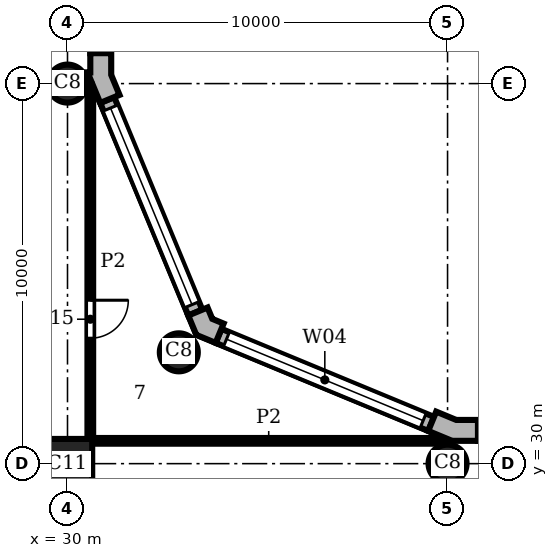
"""IFC4 building model, lengths in metres.
Left out: names, types, materials, properties, quantities, classifications, styles, units other than length and angle.
Written with IfcOpenShell. Run it as: python <this file> out.ifc"""

import sys

from ifc_helpers import new_model, si_unit, direction, frame, frame_2d, origin, origin_2d, place, context, subcontext, project, spatial, polyline, rectangle, circle, outline, extrude, element, fill, save


model = new_model("IFC4")
c1 = context("Model", 3, precision=1e-05, world=origin(), true_north=direction((0.0, 1.0)))
c2 = subcontext(c1, "Body", "Model", "MODEL_VIEW")
j1 = project(units=[si_unit("LENGTHUNIT", "METRE"), si_unit("PLANEANGLEUNIT", "RADIAN")], contexts=[c1])
p1 = place(None, origin())
s1 = spatial("IfcSite", under=j1, at=p1, CompositionType="ELEMENT")
p2 = place(p1, origin())
s2 = spatial("IfcBuilding", under=s1, at=p2, CompositionType="ELEMENT")
p3 = place(p2, frame((0.0, 0.0, 155.1)))
s3 = spatial("IfcBuildingStorey", under=s2, at=p3, CompositionType="ELEMENT", Elevation=155.1)
for number, where, z_axis, x_axis in (
    (1, (40.0, 30.0, 0.0), (0.0, 0.0, 1.0), (1.0, 0.0, 0.0)),
    (2, (32.929, 32.929, 0.0), (0.0, 0.0, 1.0), (1.0, 0.0, 0.0)),
    (3, (30.0, 40.0, 0.0), (0.0, 0.0, 1.0), (1.0, 0.0, 0.0)),
):
    element("IfcColumn", number, at=place(p3, frame(where, z_axis=z_axis, x_axis=x_axis)), inside=s3, PredefinedType="COLUMN", context=c2, shape_type="SweptSolid", body=[
        extrude(circle(Radius=0.5, at=origin_2d()), origin(), (0.0, 0.0, 1.0), 3.9),
    ])
p4 = place(p3, frame((30.0, 30.0, 0.0), z_axis=(0.0, 0.0, 1.0), x_axis=(1.0, 0.0, 0.0)))
e4 = element("IfcColumn", 4, at=p4, inside=s3, PredefinedType="COLUMN", context=c2, shape_type="SweptSolid", body=[
    extrude(rectangle(XDim=1.3, YDim=1.3, at=origin_2d()), origin(), (0.0, 0.0, 1.0), 3.9),
])
p5 = place(p3, origin())
e5 = element("IfcWall", 5, at=p5, inside=s3, PredefinedType="SOLIDWALL", context=c2, shape_type="SweptSolid", body=[
    extrude(outline(polyline([(40.8, 31.0), (40.8, 31.15), (40.229, 31.15), (39.701, 31.369), (39.644, 31.23), (39.49, 30.861), (40.119, 30.6), (40.8, 30.6), (40.8, 31.0)])), origin(), (0.0, 0.0, 1.0), 3.9),
])
e6 = element("IfcWall", 6, at=p5, inside=s3, PredefinedType="SOLIDWALL", context=c2, shape_type="SweptSolid", body=[
    extrude(outline(polyline([(34.051, 33.547), (34.108, 33.685), (33.809, 33.809), (33.685, 34.108), (33.547, 34.051), (33.177, 33.898), (33.388, 33.388), (33.898, 33.177), (34.051, 33.547)])), origin(), (0.0, 0.0, 1.0), 3.9),
])
e7 = element("IfcWall", 7, at=p5, inside=s3, PredefinedType="SOLIDWALL", context=c2, shape_type="SweptSolid", body=[
    extrude(outline(polyline([(30.62, 39.995), (30.62, 40.071), (30.861, 39.49), (31.23, 39.644), (31.369, 39.701), (31.15, 40.229), (31.15, 40.8), (31.0, 40.8), (30.6, 40.8), (30.6, 40.295), (30.5, 40.295), (30.5, 39.995), (30.62, 39.995)])), origin(), (0.0, 0.0, 1.0), 3.9),
])
p6 = place(p3, frame((59.2, 30.8, 0.0), z_axis=(0.0, 0.0, 1.0), x_axis=(-1.0, 0.0, 0.0)))
e8 = element("IfcWall", 8, at=p6, inside=s3, PredefinedType="SOLIDWALL", context=c2, shape_type="SweptSolid", body=[
    extrude(rectangle(XDim=18.4, YDim=0.4, at=frame_2d((9.2, 0.0))), origin(), (0.0, 0.0, 1.0), 3.9),
])
p7 = place(p6, frame((0.2, 0.0, 0.9)))
e9 = element("IfcOpeningElement", 9, at=p7, cuts=e8, PredefinedType="OPENING", context=c2, shape_type="SweptSolid", body=[
    extrude(rectangle(XDim=8.0, YDim=2.35, at=frame_2d((4.0, 1.175))), frame((0.0, 0.21, 0.0), z_axis=(0.0, -1.0, 0.0), x_axis=(1.0, 0.0, 0.0)), (0.0, 0.0, 1.0), 0.42),
])
p8 = place(p6, frame((10.2, 0.0, 0.9)))
e10 = element("IfcOpeningElement", 10, at=p8, cuts=e8, PredefinedType="OPENING", context=c2, shape_type="SweptSolid", body=[
    extrude(rectangle(XDim=8.0, YDim=2.35, at=frame_2d((4.0, 1.175))), frame((0.0, 0.21, 0.0), z_axis=(0.0, -1.0, 0.0), x_axis=(1.0, 0.0, 0.0)), (0.0, 0.0, 1.0), 0.42),
])
p9 = place(p3, frame((39.567, 31.045, 0.0), z_axis=(0.0, 0.0, 1.0), x_axis=(-0.923891000409, 0.382655745237, 0.0)))
e11 = element("IfcWall", 11, at=p9, inside=s3, PredefinedType="SOLIDWALL", context=c2, shape_type="SweptSolid", body=[
    extrude(rectangle(XDim=6.053, YDim=0.4, at=frame_2d((3.027, 0.0))), origin(), (0.0, 0.0, 1.0), 3.9),
])
p10 = place(p9, frame((0.227, 0.0, 0.9)))
e12 = element("IfcOpeningElement", 12, at=p10, cuts=e11, PredefinedType="OPENING", context=c2, shape_type="SweptSolid", body=[
    extrude(rectangle(XDim=5.6, YDim=2.35, at=frame_2d((2.8, 1.175))), frame((0.0, 0.21, 0.0), z_axis=(0.0, -1.0, 0.0), x_axis=(1.0, 0.0, 0.0)), (0.0, 0.0, 1.0), 0.42),
])
p11 = place(p3, frame((33.362, 33.974, 0.0), z_axis=(0.0, 0.0, 1.0), x_axis=(-0.382655745237, 0.923891000409, 0.0)))
e13 = element("IfcWall", 13, at=p11, inside=s3, PredefinedType="SOLIDWALL", context=c2, shape_type="SweptSolid", body=[
    extrude(rectangle(XDim=6.053, YDim=0.4, at=frame_2d((3.027, 0.0))), origin(), (0.0, 0.0, 1.0), 3.9),
])
p12 = place(p11, frame((0.227, 0.0, 0.9)))
e14 = element("IfcOpeningElement", 14, at=p12, cuts=e13, PredefinedType="OPENING", context=c2, shape_type="SweptSolid", body=[
    extrude(rectangle(XDim=5.6, YDim=2.35, at=frame_2d((2.8, 1.175))), frame((0.0, 0.21, 0.0), z_axis=(0.0, -1.0, 0.0), x_axis=(1.0, 0.0, 0.0)), (0.0, 0.0, 1.0), 0.42),
])
p13 = place(p3, frame((30.8, 40.8, 0.0), z_axis=(0.0, 0.0, 1.0), x_axis=(0.0, 1.0, 0.0)))
e15 = element("IfcWall", 15, at=p13, inside=s3, PredefinedType="SOLIDWALL", context=c2, shape_type="SweptSolid", body=[
    extrude(rectangle(XDim=18.4, YDim=0.4, at=frame_2d((9.2, 0.0))), origin(), (0.0, 0.0, 1.0), 3.9),
])
p14 = place(p13, frame((0.2, 0.0, 0.9)))
e16 = element("IfcOpeningElement", 16, at=p14, cuts=e15, PredefinedType="OPENING", context=c2, shape_type="SweptSolid", body=[
    extrude(rectangle(XDim=8.0, YDim=2.35, at=frame_2d((4.0, 1.175))), frame((0.0, 0.21, 0.0), z_axis=(0.0, -1.0, 0.0), x_axis=(1.0, 0.0, 0.0)), (0.0, 0.0, 1.0), 0.42),
])
p15 = place(p13, frame((10.2, 0.0, 0.9)))
e17 = element("IfcOpeningElement", 17, at=p15, cuts=e15, PredefinedType="OPENING", context=c2, shape_type="SweptSolid", body=[
    extrude(rectangle(XDim=8.0, YDim=2.35, at=frame_2d((4.0, 1.175))), frame((0.0, 0.21, 0.0), z_axis=(0.0, -1.0, 0.0), x_axis=(1.0, 0.0, 0.0)), (0.0, 0.0, 1.0), 0.42),
])
p16 = place(p3, frame((30.6, 30.65, 0.0), z_axis=(0.0, 0.0, 1.0), x_axis=(0.0, 1.0, 0.0)))
e18 = element("IfcWall", 18, at=p16, inside=s3, PredefinedType="PARTITIONING", context=c2, shape_type="SweptSolid", body=[
    extrude(rectangle(XDim=9.288, YDim=0.15, at=frame_2d((4.644, 0.0))), origin(), (0.0, 0.0, 1.0), 3.58),
])
p17 = place(p16, frame((2.65, 0.0, 0.0)))
e19 = element("IfcOpeningElement", 19, at=p17, cuts=e18, PredefinedType="OPENING", context=c2, shape_type="SweptSolid", body=[
    extrude(rectangle(XDim=1.0, YDim=2.1, at=frame_2d((0.5, 1.05))), frame((0.0, 0.085, 0.0), z_axis=(0.0, -1.0, 0.0), x_axis=(1.0, 0.0, 0.0)), (0.0, 0.0, 1.0), 0.17),
])
p18 = place(p3, frame((30.65, 30.6, 0.0), z_axis=(0.0, 0.0, 1.0), x_axis=(1.0, 0.0, 0.0)))
e20 = element("IfcWall", 20, at=p18, inside=s3, PredefinedType="PARTITIONING", context=c2, shape_type="SweptSolid", body=[
    extrude(rectangle(XDim=9.288, YDim=0.15, at=frame_2d((4.644, 0.0))), origin(), (0.0, 0.0, 1.0), 3.58),
])
p19 = place(p10, origin())
e21 = element("IfcWindow", 21, at=p19, inside=s3, PartitioningType="SINGLE_PANEL", PredefinedType="WINDOW", context=c2, shape_type="SweptSolid", body=[
    extrude(rectangle(XDim=5.6, YDim=2.35, at=frame_2d((2.8, 1.175))), frame((0.0, 0.16, 0.0), z_axis=(0.0, -1.0, 0.0), x_axis=(1.0, 0.0, 0.0)), (0.0, 0.0, 1.0), 0.06),
])
fill(e12, e21)
p20 = place(p12, origin())
e22 = element("IfcWindow", 22, at=p20, inside=s3, PartitioningType="SINGLE_PANEL", PredefinedType="WINDOW", context=c2, shape_type="SweptSolid", body=[
    extrude(rectangle(XDim=5.6, YDim=2.35, at=frame_2d((2.8, 1.175))), frame((0.0, 0.16, 0.0), z_axis=(0.0, -1.0, 0.0), x_axis=(1.0, 0.0, 0.0)), (0.0, 0.0, 1.0), 0.06),
])
fill(e14, e22)
p21 = place(p17, frame((1.0, 0.0, 0.0), z_axis=(0.0, 0.0, 1.0), x_axis=(-1.0, 0.0, 0.0)))
e23 = element("IfcDoor", 23, at=p21, inside=s3, OperationType="SINGLE_SWING_LEFT", PredefinedType="DOOR", context=c2, shape_type="SweptSolid", body=[
    extrude(rectangle(XDim=1.0, YDim=2.1, at=frame_2d((0.5, 1.05))), frame((0.0, 0.025, 0.0), z_axis=(0.0, -1.0, 0.0), x_axis=(1.0, 0.0, 0.0)), (0.0, 0.0, 1.0), 0.05),
])
fill(e19, e23)
save(model, sys.argv[1])
